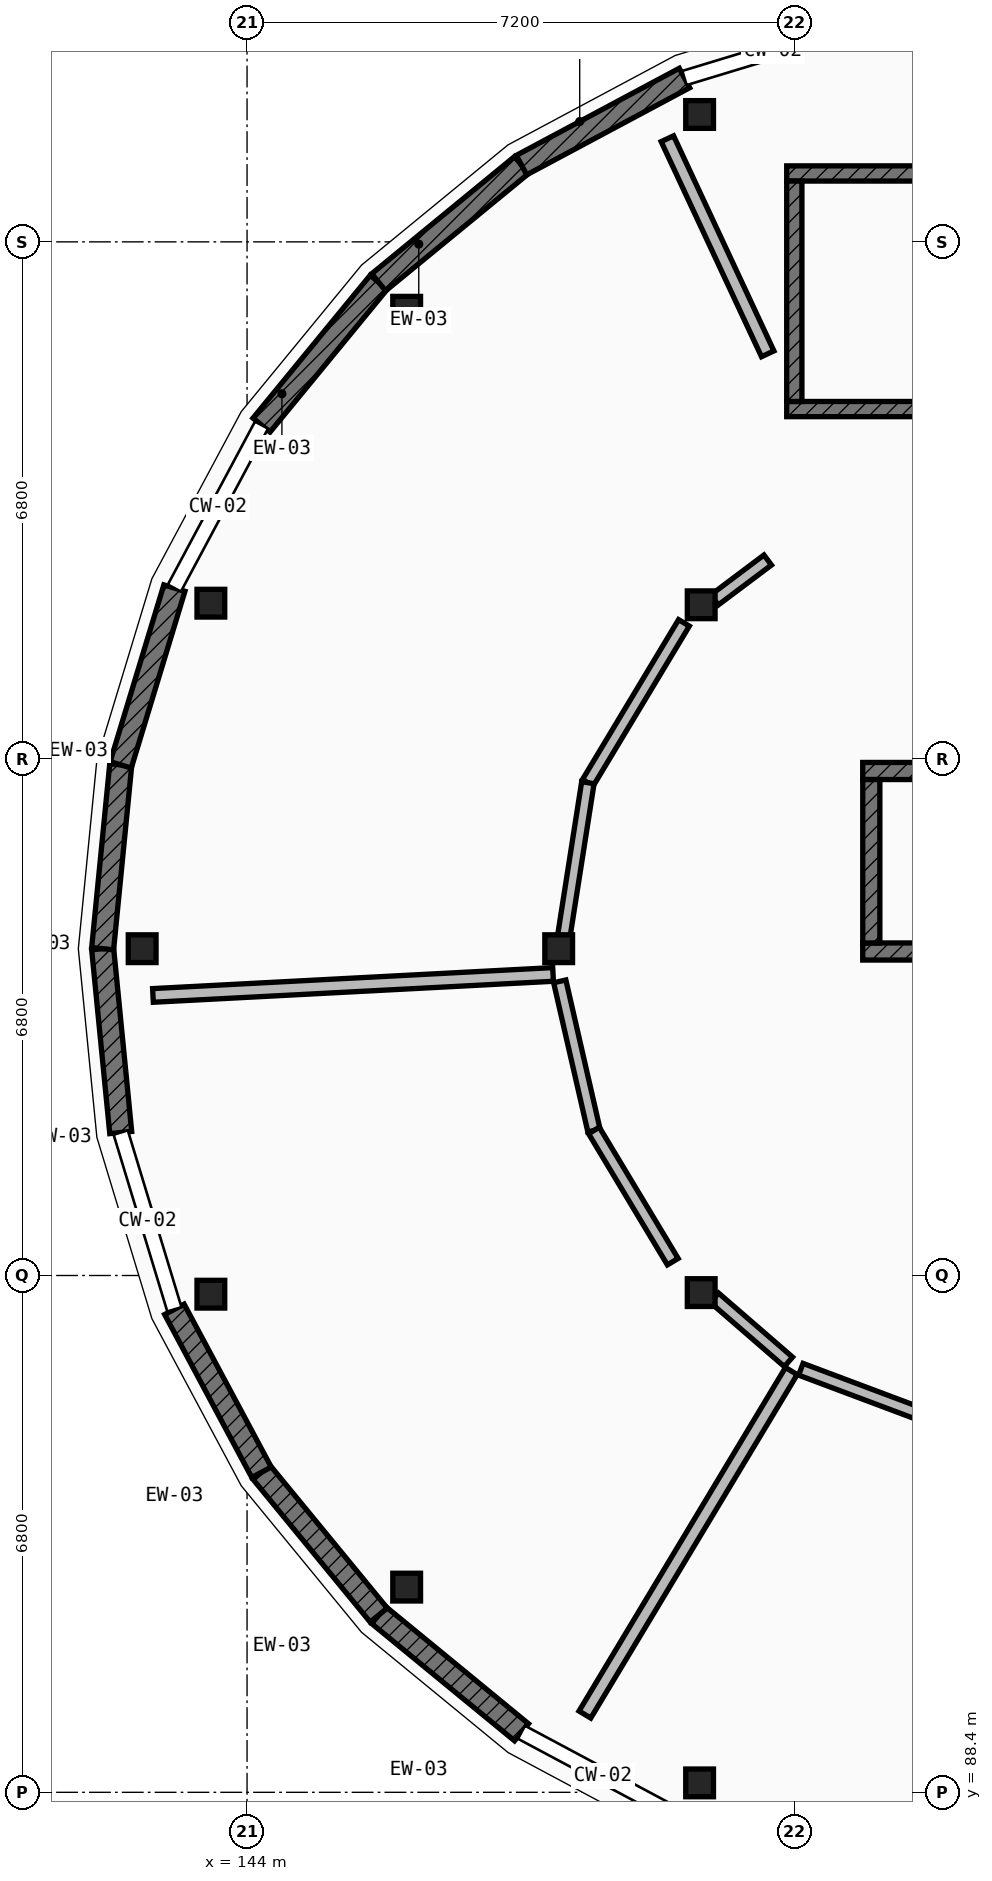
"""IFC4 building model, lengths in metres.
Left out: names, types, materials, properties, quantities, classifications, styles, units other than length and angle.
Written with IfcOpenShell. Run it as: python <this file> out.ifc"""

import sys

from ifc_helpers import new_model, si_unit, direction, frame, frame_2d, origin, origin_2d, place, context, subcontext, project, spatial, rectangle, extrude, element, fill, save


model = new_model("IFC4")
c1 = context("Model", 3, precision=1e-05, world=origin(), true_north=direction((0.0, 1.0)))
c2 = subcontext(c1, "Body", "Model", "MODEL_VIEW")
j1 = project(units=[si_unit("LENGTHUNIT", "METRE"), si_unit("PLANEANGLEUNIT", "RADIAN")], contexts=[c1])
p1 = place(None, origin())
s1 = spatial("IfcSite", under=j1, at=p1, CompositionType="ELEMENT")
p2 = place(p1, origin())
s2 = spatial("IfcBuilding", under=s1, at=p2, CompositionType="ELEMENT")
p3 = place(p2, frame((0.0, 0.0, 4.55)))
s3 = spatial("IfcBuildingStorey", under=s2, at=p3, CompositionType="ELEMENT", Elevation=4.55)
for number, where, z_axis, x_axis in (
    (1, (149.954, 110.476, 0.0), (0.0, 0.0, 1.0), (1.0, 0.0, 0.0)),
    (2, (146.1, 107.9, 0.0), (0.0, 0.0, 1.0), (1.0, 0.0, 0.0)),
    (3, (143.524, 104.046, 0.0), (0.0, 0.0, 1.0), (1.0, 0.0, 0.0)),
    (4, (142.62, 99.5, 0.0), (0.0, 0.0, 1.0), (1.0, 0.0, 0.0)),
    (5, (143.524, 94.954, 0.0), (0.0, 0.0, 1.0), (1.0, 0.0, 0.0)),
    (6, (146.1, 91.1, 0.0), (0.0, 0.0, 1.0), (1.0, 0.0, 0.0)),
    (7, (149.954, 88.524, 0.0), (0.0, 0.0, 1.0), (1.0, 0.0, 0.0)),
    (8, (149.975, 104.025, 0.0), (0.0, 0.0, 1.0), (1.0, 0.0, 0.0)),
    (9, (148.1, 99.5, 0.0), (0.0, 0.0, 1.0), (1.0, 0.0, 0.0)),
    (10, (149.975, 94.975, 0.0), (0.0, 0.0, 1.0), (1.0, 0.0, 0.0)),
):
    element("IfcColumn", number, at=place(p3, frame(where, z_axis=z_axis, x_axis=x_axis)), inside=s3, PredefinedType="COLUMN", context=c2, shape_type="SweptSolid", body=[
        extrude(rectangle(XDim=0.365, YDim=0.365, at=origin_2d()), origin(), (0.0, 0.0, 1.0), 4.2),
    ])
p4 = place(p3, frame((147.611, 89.19, 0.0), z_axis=(0.0, 0.0, 1.0), x_axis=(-0.773048113134, 0.634347392822, 0.0)))
e11 = element("IfcWall", 11, at=p4, inside=s3, PredefinedType="ELEMENTEDWALL", context=c2, shape_type="SweptSolid", body=[
    extrude(rectangle(XDim=2.431, YDim=0.29, at=frame_2d((1.215, 0.0))), origin(), (0.0, 0.0, 1.0), 3.309),
])
p5 = place(p4, frame((0.665, 0.0, 0.85)))
e12 = element("IfcOpeningElement", 12, at=p5, cuts=e11, PredefinedType="OPENING", context=c2, shape_type="SweptSolid", body=[
    extrude(rectangle(XDim=1.1, YDim=1.5, at=frame_2d((0.55, 0.75))), frame((0.0, 0.155, 0.0), z_axis=(0.0, -1.0, 0.0), x_axis=(1.0, 0.0, 0.0)), (0.0, 0.0, 1.0), 0.31),
])
p6 = place(p3, frame((145.732, 90.732, 0.0), z_axis=(0.0, 0.0, 1.0), x_axis=(-0.634347392822, 0.773048113134, 0.0)))
e13 = element("IfcWall", 13, at=p6, inside=s3, PredefinedType="ELEMENTEDWALL", context=c2, shape_type="SweptSolid", body=[
    extrude(rectangle(XDim=2.431, YDim=0.29, at=frame_2d((1.215, 0.0))), origin(), (0.0, 0.0, 1.0), 3.309),
])
p7 = place(p6, frame((0.665, 0.0, 0.85)))
e14 = element("IfcOpeningElement", 14, at=p7, cuts=e13, PredefinedType="OPENING", context=c2, shape_type="SweptSolid", body=[
    extrude(rectangle(XDim=1.1, YDim=1.85, at=frame_2d((0.55, 0.925))), frame((0.0, 0.155, 0.0), z_axis=(0.0, -1.0, 0.0), x_axis=(1.0, 0.0, 0.0)), (0.0, 0.0, 1.0), 0.31),
])
p8 = place(p3, frame((144.19, 92.611, 0.0), z_axis=(0.0, 0.0, 1.0), x_axis=(-0.471432490996, 0.881902152415, 0.0)))
e15 = element("IfcWall", 15, at=p8, inside=s3, PredefinedType="ELEMENTEDWALL", context=c2, shape_type="SweptSolid", body=[
    extrude(rectangle(XDim=2.431, YDim=0.29, at=frame_2d((1.215, 0.0))), origin(), (0.0, 0.0, 1.0), 3.309),
])
p9 = place(p8, frame((0.666, 0.0, 0.85)))
e16 = element("IfcOpeningElement", 16, at=p9, cuts=e15, PredefinedType="OPENING", context=c2, shape_type="SweptSolid", body=[
    extrude(rectangle(XDim=1.1, YDim=2.1, at=frame_2d((0.55, 1.05))), frame((0.0, 0.155, 0.0), z_axis=(0.0, -1.0, 0.0), x_axis=(1.0, 0.0, 0.0)), (0.0, 0.0, 1.0), 0.31),
])
p10 = place(p3, frame((142.338, 97.081, 0.0), z_axis=(0.0, 0.0, 1.0), x_axis=(-0.097832820839, 0.995202863323, 0.0)))
e17 = element("IfcWall", 17, at=p10, inside=s3, PredefinedType="ELEMENTEDWALL", context=c2, shape_type="SweptSolid", body=[
    extrude(rectangle(XDim=2.431, YDim=0.29, at=frame_2d((1.215, 0.0))), origin(), (0.0, 0.0, 1.0), 3.309),
])
p11 = place(p10, frame((0.655, 0.0, 0.85)))
e18 = element("IfcOpeningElement", 18, at=p11, cuts=e17, PredefinedType="OPENING", context=c2, shape_type="SweptSolid", body=[
    extrude(rectangle(XDim=1.12, YDim=1.65, at=frame_2d((0.56, 0.825))), frame((0.0, 0.155, 0.0), z_axis=(0.0, -1.0, 0.0), x_axis=(1.0, 0.0, 0.0)), (0.0, 0.0, 1.0), 0.31),
])
p12 = place(p3, frame((142.1, 99.5, 0.0), z_axis=(0.0, 0.0, 1.0), x_axis=(0.097832820839, 0.995202863323, 0.0)))
e19 = element("IfcWall", 19, at=p12, inside=s3, PredefinedType="ELEMENTEDWALL", context=c2, shape_type="SweptSolid", body=[
    extrude(rectangle(XDim=2.431, YDim=0.29, at=frame_2d((1.215, 0.0))), origin(), (0.0, 0.0, 1.0), 3.309),
])
p13 = place(p12, frame((0.64, 0.0, 0.85)))
e20 = element("IfcOpeningElement", 20, at=p13, cuts=e19, PredefinedType="OPENING", context=c2, shape_type="SweptSolid", body=[
    extrude(rectangle(XDim=1.15, YDim=1.4, at=frame_2d((0.575, 0.7))), frame((0.0, 0.155, 0.0), z_axis=(0.0, -1.0, 0.0), x_axis=(1.0, 0.0, 0.0)), (0.0, 0.0, 1.0), 0.31),
])
p14 = place(p3, frame((142.338, 101.919, 0.0), z_axis=(0.0, 0.0, 1.0), x_axis=(0.290442193951, 0.956892539407, 0.0)))
e21 = element("IfcWall", 21, at=p14, inside=s3, PredefinedType="ELEMENTEDWALL", context=c2, shape_type="SweptSolid", body=[
    extrude(rectangle(XDim=2.431, YDim=0.29, at=frame_2d((1.215, 0.0))), origin(), (0.0, 0.0, 1.0), 3.309),
])
p15 = place(p14, frame((0.64, 0.0, 0.85)))
e22 = element("IfcOpeningElement", 22, at=p15, cuts=e21, PredefinedType="OPENING", context=c2, shape_type="SweptSolid", body=[
    extrude(rectangle(XDim=1.15, YDim=1.7, at=frame_2d((0.575, 0.85))), frame((0.0, 0.155, 0.0), z_axis=(0.0, -1.0, 0.0), x_axis=(1.0, 0.0, 0.0)), (0.0, 0.0, 1.0), 0.31),
])
p16 = place(p3, frame((144.19, 106.389, 0.0), z_axis=(0.0, 0.0, 1.0), x_axis=(0.634347392822, 0.773048113134, 0.0)))
e23 = element("IfcWall", 23, at=p16, inside=s3, PredefinedType="ELEMENTEDWALL", context=c2, shape_type="SweptSolid", body=[
    extrude(rectangle(XDim=2.431, YDim=0.29, at=frame_2d((1.215, 0.0))), origin(), (0.0, 0.0, 1.0), 3.309),
])
p17 = place(p16, frame((0.64, 0.0, 0.85)))
e24 = element("IfcOpeningElement", 24, at=p17, cuts=e23, PredefinedType="OPENING", context=c2, shape_type="SweptSolid", body=[
    extrude(rectangle(XDim=1.15, YDim=2.0, at=frame_2d((0.575, 1.0))), frame((0.0, 0.155, 0.0), z_axis=(0.0, -1.0, 0.0), x_axis=(1.0, 0.0, 0.0)), (0.0, 0.0, 1.0), 0.31),
])
p18 = place(p3, frame((145.732, 108.268, 0.0), z_axis=(0.0, 0.0, 1.0), x_axis=(0.773048113134, 0.634347392822, 0.0)))
e25 = element("IfcWall", 25, at=p18, inside=s3, PredefinedType="ELEMENTEDWALL", context=c2, shape_type="SweptSolid", body=[
    extrude(rectangle(XDim=2.431, YDim=0.29, at=frame_2d((1.215, 0.0))), origin(), (0.0, 0.0, 1.0), 3.309),
])
p19 = place(p18, frame((0.64, 0.0, 0.85)))
e26 = element("IfcOpeningElement", 26, at=p19, cuts=e25, PredefinedType="OPENING", context=c2, shape_type="SweptSolid", body=[
    extrude(rectangle(XDim=1.15, YDim=2.25, at=frame_2d((0.575, 1.125))), frame((0.0, 0.155, 0.0), z_axis=(0.0, -1.0, 0.0), x_axis=(1.0, 0.0, 0.0)), (0.0, 0.0, 1.0), 0.31),
])
p20 = place(p3, frame((147.611, 109.81, 0.0), z_axis=(0.0, 0.0, 1.0), x_axis=(0.881902152415, 0.471432490996, 0.0)))
e27 = element("IfcWall", 27, at=p20, inside=s3, PredefinedType="ELEMENTEDWALL", context=c2, shape_type="SweptSolid", body=[
    extrude(rectangle(XDim=2.431, YDim=0.29, at=frame_2d((1.215, 0.0))), origin(), (0.0, 0.0, 1.0), 3.309),
])
p21 = place(p20, frame((0.626, 0.0, 0.85)))
e28 = element("IfcOpeningElement", 28, at=p21, cuts=e27, PredefinedType="OPENING", context=c2, shape_type="SweptSolid", body=[
    extrude(rectangle(XDim=1.18, YDim=1.55, at=frame_2d((0.59, 0.775))), frame((0.0, 0.155, 0.0), z_axis=(0.0, -1.0, 0.0), x_axis=(1.0, 0.0, 0.0)), (0.0, 0.0, 1.0), 0.31),
])
p22 = place(p3, frame((151.1, 106.6, 0.0), z_axis=(0.0, 0.0, 1.0), x_axis=(1.0, 0.0, 0.0)))
e29 = element("IfcWall", 29, at=p22, inside=s3, PredefinedType="SHEAR", context=c2, shape_type="SweptSolid", body=[
    extrude(rectangle(XDim=6.8, YDim=0.2, at=frame_2d((3.4, 0.0))), origin(), (0.0, 0.0, 1.0), 3.955),
])
p23 = place(p22, frame((0.38, 0.0, 0.0)))
e30 = element("IfcOpeningElement", 30, at=p23, cuts=e29, PredefinedType="OPENING", context=c2, shape_type="SweptSolid", body=[
    extrude(rectangle(XDim=1.05, YDim=2.15, at=frame_2d((0.525, 1.075))), frame((0.0, 0.11, 0.0), z_axis=(0.0, -1.0, 0.0), x_axis=(1.0, 0.0, 0.0)), (0.0, 0.0, 1.0), 0.22),
])
p24 = place(p3, frame((151.1, 109.7, 0.0), z_axis=(0.0, 0.0, 1.0), x_axis=(1.0, 0.0, 0.0)))
e31 = element("IfcWall", 31, at=p24, inside=s3, PredefinedType="SHEAR", context=c2, shape_type="SweptSolid", body=[
    extrude(rectangle(XDim=6.8, YDim=0.2, at=frame_2d((3.4, 0.0))), origin(), (0.0, 0.0, 1.0), 3.955),
])
p25 = place(p3, frame((151.2, 106.7, 0.0), z_axis=(0.0, 0.0, 1.0), x_axis=(0.0, 1.0, 0.0)))
e32 = element("IfcWall", 32, at=p25, inside=s3, PredefinedType="SHEAR", context=c2, shape_type="SweptSolid", body=[
    extrude(rectangle(XDim=2.9, YDim=0.2, at=frame_2d((1.45, 0.0))), origin(), (0.0, 0.0, 1.0), 3.955),
])
p26 = place(p3, frame((152.1, 99.463, 0.0), z_axis=(0.0, 0.0, 1.0), x_axis=(1.0, 0.0, 0.0)))
e33 = element("IfcWall", 33, at=p26, inside=s3, PredefinedType="SHEAR", context=c2, shape_type="SweptSolid", body=[
    extrude(rectangle(XDim=3.1, YDim=0.225, at=frame_2d((1.55, 0.0))), origin(), (0.0, 0.0, 1.0), 3.955),
])
p27 = place(p26, frame((0.9, 0.0, 0.0)))
e34 = element("IfcOpeningElement", 34, at=p27, cuts=e33, PredefinedType="OPENING", context=c2, shape_type="SweptSolid", body=[
    extrude(rectangle(XDim=1.3, YDim=2.2, at=frame_2d((0.65, 1.1))), frame((0.0, 0.123, 0.0), z_axis=(0.0, -1.0, 0.0), x_axis=(1.0, 0.0, 0.0)), (0.0, 0.0, 1.0), 0.245),
])
p28 = place(p3, frame((152.1, 101.838, 0.0), z_axis=(0.0, 0.0, 1.0), x_axis=(1.0, 0.0, 0.0)))
e35 = element("IfcWall", 35, at=p28, inside=s3, PredefinedType="SHEAR", context=c2, shape_type="SweptSolid", body=[
    extrude(rectangle(XDim=3.1, YDim=0.225, at=frame_2d((1.55, 0.0))), origin(), (0.0, 0.0, 1.0), 3.955),
])
p29 = place(p3, frame((152.213, 99.575, 0.0), z_axis=(0.0, 0.0, 1.0), x_axis=(0.0, 1.0, 0.0)))
e36 = element("IfcWall", 36, at=p29, inside=s3, PredefinedType="SHEAR", context=c2, shape_type="SweptSolid", body=[
    extrude(rectangle(XDim=2.15, YDim=0.225, at=frame_2d((1.075, 0.0))), origin(), (0.0, 0.0, 1.0), 3.955),
])
p30 = place(p3, frame((150.85, 107.327, 0.0), z_axis=(0.0, 0.0, 1.0), x_axis=(-0.422718541288, 0.906261019162, 0.0)))
e37 = element("IfcWall", 37, at=p30, inside=s3, PredefinedType="PARTITIONING", context=c2, shape_type="SweptSolid", body=[
    extrude(rectangle(XDim=3.123, YDim=0.18, at=frame_2d((1.562, 0.0))), origin(), (0.0, 0.0, 1.0), 3.284),
])
p31 = place(p3, frame((148.026, 99.161, 0.0), z_axis=(0.0, 0.0, 1.0), x_axis=(-0.998629447921, -0.052337613105, 0.0)))
e38 = element("IfcWall", 38, at=p31, inside=s3, PredefinedType="PARTITIONING", context=c2, shape_type="SweptSolid", body=[
    extrude(rectangle(XDim=5.271, YDim=0.18, at=frame_2d((2.636, 0.0))), origin(), (0.0, 0.0, 1.0), 3.284),
])
p32 = place(p3, frame((151.161, 93.943, 0.0), z_axis=(0.0, 0.0, 1.0), x_axis=(-0.515026730069, -0.857174117268, 0.0)))
e39 = element("IfcWall", 39, at=p32, inside=s3, PredefinedType="PARTITIONING", context=c2, shape_type="SweptSolid", body=[
    extrude(rectangle(XDim=5.273, YDim=0.18, at=frame_2d((2.637, 0.0))), origin(), (0.0, 0.0, 1.0), 3.284),
])
p33 = place(p3, frame((150.85, 104.614, 0.0), z_axis=(0.0, 0.0, 1.0), x_axis=(-0.799731853613, -0.600357362174, 0.0)))
e40 = element("IfcWall", 40, at=p33, inside=s3, PredefinedType="PARTITIONING", context=c2, shape_type="SweptSolid", body=[
    extrude(rectangle(XDim=0.874, YDim=0.165, at=frame_2d((0.437, 0.0))), origin(), (0.0, 0.0, 1.0), 3.284),
])
p34 = place(p3, frame((149.748, 103.787, 0.0), z_axis=(0.0, 0.0, 1.0), x_axis=(-0.515197917959, -0.857071237022, 0.0)))
e41 = element("IfcWall", 41, at=p34, inside=s3, PredefinedType="PARTITIONING", context=c2, shape_type="SweptSolid", body=[
    extrude(rectangle(XDim=2.454, YDim=0.165, at=frame_2d((1.227, 0.0))), origin(), (0.0, 0.0, 1.0), 3.284),
])
p35 = place(p34, frame((0.527, 0.0, 0.0)))
e42 = element("IfcOpeningElement", 42, at=p35, cuts=e41, PredefinedType="OPENING", context=c2, shape_type="SweptSolid", body=[
    extrude(rectangle(XDim=1.4, YDim=2.25, at=frame_2d((0.7, 1.125))), frame((0.0, 0.093, 0.0), z_axis=(0.0, -1.0, 0.0), x_axis=(1.0, 0.0, 0.0)), (0.0, 0.0, 1.0), 0.185),
])
p36 = place(p3, frame((148.484, 101.684, 0.0), z_axis=(0.0, 0.0, 1.0), x_axis=(-0.154797832722, -0.98794616806, 0.0)))
e43 = element("IfcWall", 43, at=p36, inside=s3, PredefinedType="PARTITIONING", context=c2, shape_type="SweptSolid", body=[
    extrude(rectangle(XDim=2.034, YDim=0.165, at=frame_2d((1.017, 0.0))), origin(), (0.0, 0.0, 1.0), 3.284),
])
p37 = place(p3, frame((148.114, 99.07, 0.0), z_axis=(0.0, 0.0, 1.0), x_axis=(0.223512984269, -0.974700952017, 0.0)))
e44 = element("IfcWall", 44, at=p37, inside=s3, PredefinedType="PARTITIONING", context=c2, shape_type="SweptSolid", body=[
    extrude(rectangle(XDim=2.013, YDim=0.165, at=frame_2d((1.007, 0.0))), origin(), (0.0, 0.0, 1.0), 3.284),
])
p38 = place(p37, frame((0.257, 0.0, 0.0)))
e45 = element("IfcOpeningElement", 45, at=p38, cuts=e44, PredefinedType="OPENING", context=c2, shape_type="SweptSolid", body=[
    extrude(rectangle(XDim=1.5, YDim=2.3, at=frame_2d((0.75, 1.15))), frame((0.0, 0.093, 0.0), z_axis=(0.0, -1.0, 0.0), x_axis=(1.0, 0.0, 0.0)), (0.0, 0.0, 1.0), 0.185),
])
p39 = place(p3, frame((148.564, 97.108, 0.0), z_axis=(0.0, 0.0, 1.0), x_axis=(0.515084069478, -0.857139662698, 0.0)))
e46 = element("IfcWall", 46, at=p39, inside=s3, PredefinedType="PARTITIONING", context=c2, shape_type="SweptSolid", body=[
    extrude(rectangle(XDim=2.013, YDim=0.165, at=frame_2d((1.007, 0.0))), origin(), (0.0, 0.0, 1.0), 3.284),
])
p40 = place(p3, frame((150.149, 94.907, 0.0), z_axis=(0.0, 0.0, 1.0), x_axis=(0.756157862191, -0.654389247655, 0.0)))
e47 = element("IfcWall", 47, at=p40, inside=s3, PredefinedType="PARTITIONING", context=c2, shape_type="SweptSolid", body=[
    extrude(rectangle(XDim=1.288, YDim=0.165, at=frame_2d((0.644, 0.0))), origin(), (0.0, 0.0, 1.0), 3.284),
])
p41 = place(p3, frame((151.286, 93.966, 0.0), z_axis=(0.0, 0.0, 1.0), x_axis=(0.93623488757, -0.35137477897, 0.0)))
e48 = element("IfcWall", 48, at=p41, inside=s3, PredefinedType="PARTITIONING", context=c2, shape_type="SweptSolid", body=[
    extrude(rectangle(XDim=2.129, YDim=0.165, at=frame_2d((1.064, 0.0))), origin(), (0.0, 0.0, 1.0), 3.284),
])
p42 = place(p41, frame((0.365, 0.0, 0.0)))
e49 = element("IfcOpeningElement", 49, at=p42, cuts=e48, PredefinedType="OPENING", context=c2, shape_type="SweptSolid", body=[
    extrude(rectangle(XDim=1.4, YDim=2.25, at=frame_2d((0.7, 1.125))), frame((0.0, 0.093, 0.0), z_axis=(0.0, -1.0, 0.0), x_axis=(1.0, 0.0, 0.0)), (0.0, 0.0, 1.0), 0.185),
])
p43 = place(p5, origin())
e50 = element("IfcWindow", 50, at=p43, inside=s3, PartitioningType="SINGLE_PANEL", PredefinedType="WINDOW", context=c2, shape_type="SweptSolid", body=[
    extrude(rectangle(XDim=1.1, YDim=1.5, at=frame_2d((0.55, 0.75))), frame((0.0, 0.03, 0.0), z_axis=(0.0, -1.0, 0.0), x_axis=(1.0, 0.0, 0.0)), (0.0, 0.0, 1.0), 0.06),
])
fill(e12, e50)
p44 = place(p7, origin())
e51 = element("IfcWindow", 51, at=p44, inside=s3, PartitioningType="SINGLE_PANEL", PredefinedType="WINDOW", context=c2, shape_type="SweptSolid", body=[
    extrude(rectangle(XDim=1.1, YDim=1.85, at=frame_2d((0.55, 0.925))), frame((0.0, 0.03, 0.0), z_axis=(0.0, -1.0, 0.0), x_axis=(1.0, 0.0, 0.0)), (0.0, 0.0, 1.0), 0.06),
])
fill(e14, e51)
p45 = place(p9, origin())
e52 = element("IfcWindow", 52, at=p45, inside=s3, PartitioningType="SINGLE_PANEL", PredefinedType="WINDOW", context=c2, shape_type="SweptSolid", body=[
    extrude(rectangle(XDim=1.1, YDim=2.1, at=frame_2d((0.55, 1.05))), frame((0.0, 0.03, 0.0), z_axis=(0.0, -1.0, 0.0), x_axis=(1.0, 0.0, 0.0)), (0.0, 0.0, 1.0), 0.06),
])
fill(e16, e52)
p46 = place(p11, origin())
e53 = element("IfcWindow", 53, at=p46, inside=s3, PartitioningType="SINGLE_PANEL", PredefinedType="WINDOW", context=c2, shape_type="SweptSolid", body=[
    extrude(rectangle(XDim=1.12, YDim=1.65, at=frame_2d((0.56, 0.825))), frame((0.0, 0.03, 0.0), z_axis=(0.0, -1.0, 0.0), x_axis=(1.0, 0.0, 0.0)), (0.0, 0.0, 1.0), 0.06),
])
fill(e18, e53)
p47 = place(p13, origin())
e54 = element("IfcWindow", 54, at=p47, inside=s3, PartitioningType="SINGLE_PANEL", PredefinedType="WINDOW", context=c2, shape_type="SweptSolid", body=[
    extrude(rectangle(XDim=1.15, YDim=1.4, at=frame_2d((0.575, 0.7))), frame((0.0, 0.03, 0.0), z_axis=(0.0, -1.0, 0.0), x_axis=(1.0, 0.0, 0.0)), (0.0, 0.0, 1.0), 0.06),
])
fill(e20, e54)
p48 = place(p15, origin())
e55 = element("IfcWindow", 55, at=p48, inside=s3, PartitioningType="SINGLE_PANEL", PredefinedType="WINDOW", context=c2, shape_type="SweptSolid", body=[
    extrude(rectangle(XDim=1.15, YDim=1.7, at=frame_2d((0.575, 0.85))), frame((0.0, 0.03, 0.0), z_axis=(0.0, -1.0, 0.0), x_axis=(1.0, 0.0, 0.0)), (0.0, 0.0, 1.0), 0.06),
])
fill(e22, e55)
p49 = place(p17, origin())
e56 = element("IfcWindow", 56, at=p49, inside=s3, PartitioningType="SINGLE_PANEL", PredefinedType="WINDOW", context=c2, shape_type="SweptSolid", body=[
    extrude(rectangle(XDim=1.15, YDim=2.0, at=frame_2d((0.575, 1.0))), frame((0.0, 0.03, 0.0), z_axis=(0.0, -1.0, 0.0), x_axis=(1.0, 0.0, 0.0)), (0.0, 0.0, 1.0), 0.06),
])
fill(e24, e56)
p50 = place(p19, origin())
e57 = element("IfcWindow", 57, at=p50, inside=s3, PartitioningType="SINGLE_PANEL", PredefinedType="WINDOW", context=c2, shape_type="SweptSolid", body=[
    extrude(rectangle(XDim=1.15, YDim=2.25, at=frame_2d((0.575, 1.125))), frame((0.0, 0.03, 0.0), z_axis=(0.0, -1.0, 0.0), x_axis=(1.0, 0.0, 0.0)), (0.0, 0.0, 1.0), 0.06),
])
fill(e26, e57)
p51 = place(p21, origin())
e58 = element("IfcWindow", 58, at=p51, inside=s3, PartitioningType="SINGLE_PANEL", PredefinedType="WINDOW", context=c2, shape_type="SweptSolid", body=[
    extrude(rectangle(XDim=1.18, YDim=1.55, at=frame_2d((0.59, 0.775))), frame((0.0, 0.03, 0.0), z_axis=(0.0, -1.0, 0.0), x_axis=(1.0, 0.0, 0.0)), (0.0, 0.0, 1.0), 0.06),
])
fill(e28, e58)
p52 = place(p23, origin())
e59 = element("IfcDoor", 59, at=p52, inside=s3, OperationType="SINGLE_SWING_RIGHT", PredefinedType="DOOR", context=c2, shape_type="SweptSolid", body=[
    extrude(rectangle(XDim=1.05, YDim=2.15, at=frame_2d((0.525, 1.075))), frame((0.0, 0.025, 0.0), z_axis=(0.0, -1.0, 0.0), x_axis=(1.0, 0.0, 0.0)), (0.0, 0.0, 1.0), 0.05),
])
fill(e30, e59)
p53 = place(p35, origin())
e60 = element("IfcDoor", 60, at=p53, inside=s3, OperationType="SINGLE_SWING_RIGHT", PredefinedType="DOOR", context=c2, shape_type="SweptSolid", body=[
    extrude(rectangle(XDim=1.4, YDim=2.25, at=frame_2d((0.7, 1.125))), frame((0.0, 0.025, 0.0), z_axis=(0.0, -1.0, 0.0), x_axis=(1.0, 0.0, 0.0)), (0.0, 0.0, 1.0), 0.05),
])
fill(e42, e60)
p54 = place(p38, origin())
e61 = element("IfcDoor", 61, at=p54, inside=s3, OperationType="SINGLE_SWING_LEFT", PredefinedType="DOOR", context=c2, shape_type="SweptSolid", body=[
    extrude(rectangle(XDim=1.5, YDim=2.3, at=frame_2d((0.75, 1.15))), frame((0.0, 0.025, 0.0), z_axis=(0.0, -1.0, 0.0), x_axis=(1.0, 0.0, 0.0)), (0.0, 0.0, 1.0), 0.05),
])
fill(e45, e61)
p55 = place(p42, origin())
e62 = element("IfcDoor", 62, at=p55, inside=s3, OperationType="SINGLE_SWING_RIGHT", PredefinedType="DOOR", context=c2, shape_type="SweptSolid", body=[
    extrude(rectangle(XDim=1.4, YDim=2.25, at=frame_2d((0.7, 1.125))), frame((0.0, 0.025, 0.0), z_axis=(0.0, -1.0, 0.0), x_axis=(1.0, 0.0, 0.0)), (0.0, 0.0, 1.0), 0.05),
])
fill(e49, e62)
save(model, sys.argv[1])
